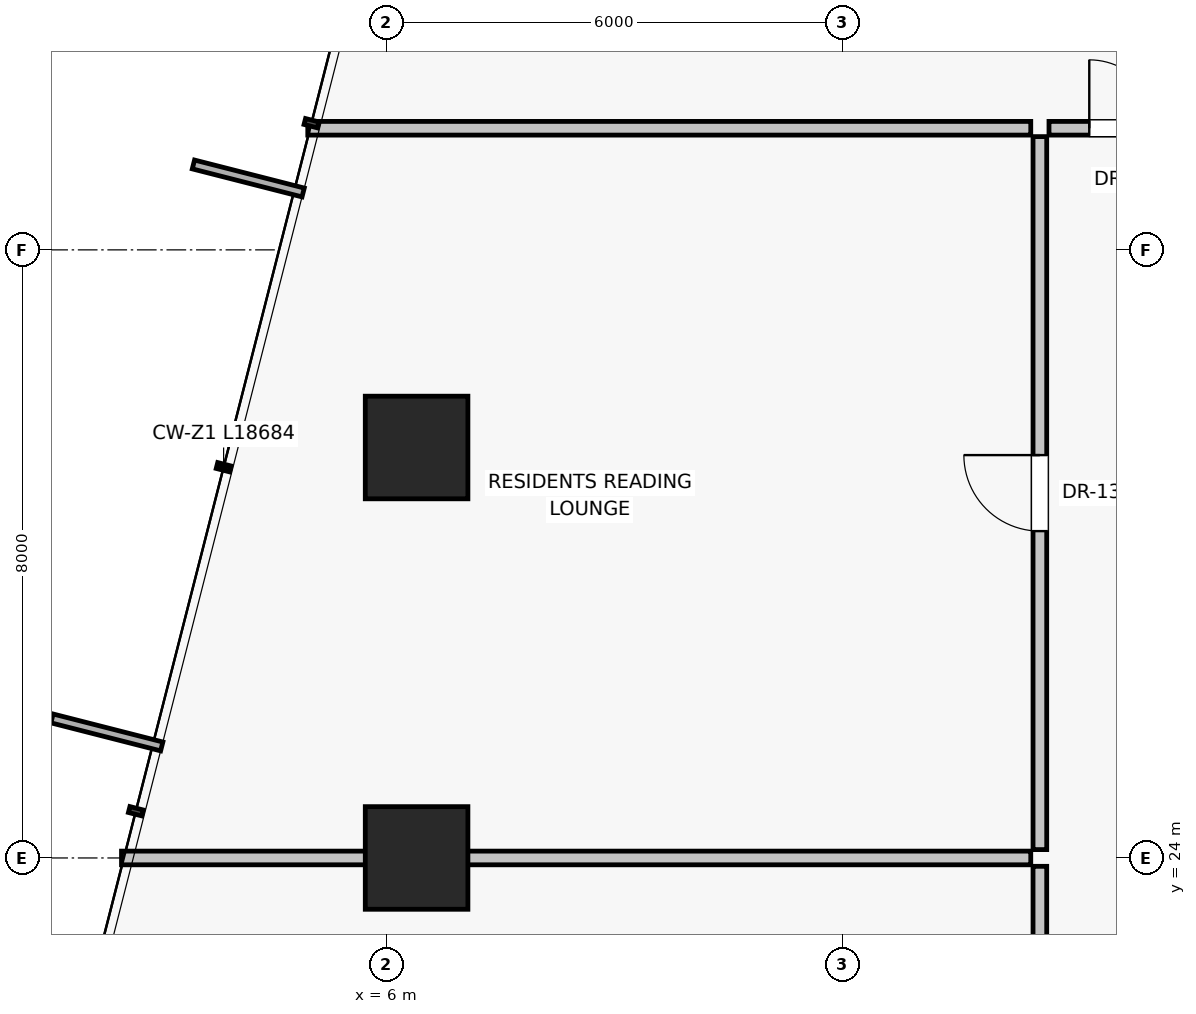
"""IFC4 building model, lengths in metres.
Left out: names, types, materials, properties, quantities, classifications, styles, units other than length and angle.
Written with IfcOpenShell. Run it as: python <this file> out.ifc"""

import sys

from ifc_helpers import new_model, si_unit, direction, frame, frame_2d, origin, origin_2d, place, context, subcontext, project, spatial, rectangle, extrude, source, transform, mapped, element, fill, save


model = new_model("IFC4")
c1 = context("Model", 3, precision=1e-05, world=origin(), true_north=direction((0.0, 1.0)))
c2 = subcontext(c1, "Body", "Model", "MODEL_VIEW")
j1 = project(units=[si_unit("LENGTHUNIT", "METRE"), si_unit("PLANEANGLEUNIT", "RADIAN")], contexts=[c1])
p1 = place(None, origin())
s1 = spatial("IfcSite", under=j1, at=p1, CompositionType="ELEMENT")
p2 = place(p1, origin())
s2 = spatial("IfcBuilding", under=s1, at=p2, CompositionType="ELEMENT")
p3 = place(p2, frame((0.0, 0.0, 77.1)))
s3 = spatial("IfcBuildingStorey", under=s2, at=p3, CompositionType="ELEMENT", Elevation=77.1)
for number, where, z_axis, x_axis in (
    (1, (6.4, 29.4, 0.0), (0.0, 0.0, 1.0), (1.0, 0.0, 0.0)),
    (2, (6.4, 24.0, 0.0), (0.0, 0.0, 1.0), (1.0, 0.0, 0.0)),
):
    element("IfcColumn", number, at=place(p3, frame(where, z_axis=z_axis, x_axis=x_axis)), inside=s3, PredefinedType="COLUMN", context=c2, shape_type="SweptSolid", body=[
        extrude(rectangle(XDim=1.35, YDim=1.35, at=origin_2d()), origin(), (0.0, 0.0, 1.0), 3.25),
    ])
p4 = place(p3, frame((14.48, 33.6, 0.0), z_axis=(0.0, 0.0, 1.0), x_axis=(-1.0, 0.0, 0.0)))
e3 = element("IfcWall", 3, at=p4, inside=s3, PredefinedType="PARTITIONING", context=c2, shape_type="SweptSolid", body=[
    extrude(rectangle(XDim=9.511, YDim=0.18, at=frame_2d((4.756, 0.0))), origin(), (0.0, 0.0, 1.0), 2.93),
])
p5 = place(p3, frame((14.6, 19.16, 0.0), z_axis=(0.0, 0.0, 1.0), x_axis=(0.0, 1.0, 0.0)))
e4 = element("IfcWall", 4, at=p5, inside=s3, PredefinedType="PARTITIONING", context=c2, shape_type="SweptSolid", body=[
    extrude(rectangle(XDim=4.73, YDim=0.18, at=frame_2d((2.365, 0.0))), origin(), (0.0, 0.0, 1.0), 2.93),
])
p6 = place(p5, frame((1.865, 0.0, 0.0)))
e5 = element("IfcOpeningElement", 5, at=p6, cuts=e4, PredefinedType="OPENING", context=c2, shape_type="SweptSolid", body=[
    extrude(rectangle(XDim=1.0, YDim=2.01, at=frame_2d((0.5, 1.005))), frame((0.0, 0.1, 0.0), z_axis=(0.0, -1.0, 0.0), x_axis=(1.0, 0.0, 0.0)), (0.0, 0.0, 1.0), 0.2),
])
p7 = place(p3, frame((14.6, 24.11, 0.0), z_axis=(0.0, 0.0, 1.0), x_axis=(0.0, 1.0, 0.0)))
e6 = element("IfcWall", 6, at=p7, inside=s3, PredefinedType="PARTITIONING", context=c2, shape_type="SweptSolid", body=[
    extrude(rectangle(XDim=9.38, YDim=0.18, at=frame_2d((4.69, 0.0))), origin(), (0.0, 0.0, 1.0), 2.93),
])
p8 = place(p7, frame((4.19, 0.0, 0.0)))
e7 = element("IfcOpeningElement", 7, at=p8, cuts=e6, PredefinedType="OPENING", context=c2, shape_type="SweptSolid", body=[
    extrude(rectangle(XDim=1.0, YDim=2.01, at=frame_2d((0.5, 1.005))), frame((0.0, 0.1, 0.0), z_axis=(0.0, -1.0, 0.0), x_axis=(1.0, 0.0, 0.0)), (0.0, 0.0, 1.0), 0.2),
])
p9 = place(p3, frame((14.48, 24.0, 0.0), z_axis=(0.0, 0.0, 1.0), x_axis=(-1.0, 0.0, 0.0)))
e8 = element("IfcWall", 8, at=p9, inside=s3, PredefinedType="PARTITIONING", context=c2, shape_type="SweptSolid", body=[
    extrude(rectangle(XDim=11.962, YDim=0.18, at=frame_2d((5.981, 0.0))), origin(), (0.0, 0.0, 1.0), 2.93),
])
p10 = place(p3, frame((14.72, 33.6, 0.0), z_axis=(0.0, 0.0, 1.0), x_axis=(1.0, 0.0, 0.0)))
e9 = element("IfcWall", 9, at=p10, inside=s3, PredefinedType="PARTITIONING", context=c2, shape_type="SweptSolid", body=[
    extrude(rectangle(XDim=1.96, YDim=0.18, at=frame_2d((0.98, 0.0))), origin(), (0.0, 0.0, 1.0), 2.93),
])
p11 = place(p10, frame((0.53, 0.0, 0.0)))
e10 = element("IfcOpeningElement", 10, at=p11, cuts=e9, PredefinedType="OPENING", context=c2, shape_type="SweptSolid", body=[
    extrude(rectangle(XDim=0.9, YDim=2.01, at=frame_2d((0.45, 1.005))), frame((0.0, 0.1, 0.0), z_axis=(0.0, -1.0, 0.0), x_axis=(1.0, 0.0, 0.0)), (0.0, 0.0, 1.0), 0.2),
])
m1 = source(origin(), c2, "Body", "SweptSolid", [
    extrude(rectangle(XDim=1.0, YDim=2.01, at=frame_2d((0.5, 1.005))), frame((0.0, 0.025, 0.0), z_axis=(0.0, -1.0, 0.0), x_axis=(1.0, 0.0, 0.0)), (0.0, 0.0, 1.0), 0.05),
])
p12 = place(p8, origin())
e11 = element("IfcDoor", 11, at=p12, inside=s3, OperationType="SINGLE_SWING_RIGHT", PredefinedType="DOOR", context=c2, shape_type="MappedRepresentation", body=[
    mapped(m1, transform((0.0, 0.0, 0.0), scale=1.0)),
])
fill(e7, e11)
m2 = source(origin(), c2, "Body", "SweptSolid", [
    extrude(rectangle(XDim=0.9, YDim=2.01, at=frame_2d((0.45, 1.005))), frame((0.0, 0.025, 0.0), z_axis=(0.0, -1.0, 0.0), x_axis=(1.0, 0.0, 0.0)), (0.0, 0.0, 1.0), 0.05),
])
p13 = place(p11, origin())
e12 = element("IfcDoor", 12, at=p13, inside=s3, OperationType="SINGLE_SWING_LEFT", PredefinedType="DOOR", context=c2, shape_type="MappedRepresentation", body=[
    mapped(m2, transform((0.0, 0.0, 0.0), scale=1.0)),
])
fill(e10, e12)
save(model, sys.argv[1])
